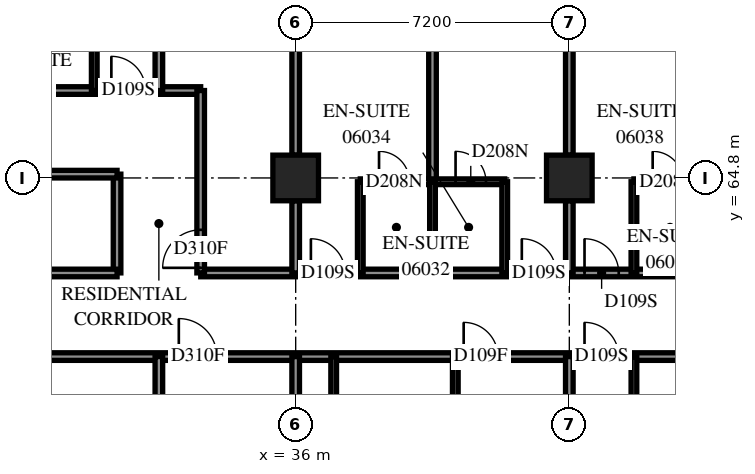
"""IFC4 building model, lengths in metres.
Left out: names, types, materials, properties, quantities, classifications, styles, units other than length and angle.
Written with IfcOpenShell. Run it as: python <this file> out.ifc"""

import sys

from ifc_helpers import new_model, si_unit, direction, frame, frame_2d, origin, origin_2d, place, context, subcontext, project, spatial, rectangle, extrude, element, fill, save


model = new_model("IFC4")
c1 = context("Model", 3, precision=1e-05, world=origin(), true_north=direction((0.0, 1.0)))
c2 = subcontext(c1, "Body", "Model", "MODEL_VIEW")
j1 = project(units=[si_unit("LENGTHUNIT", "METRE"), si_unit("PLANEANGLEUNIT", "RADIAN")], contexts=[c1])
p1 = place(None, origin())
s1 = spatial("IfcSite", under=j1, at=p1, CompositionType="ELEMENT")
p2 = place(p1, origin())
s2 = spatial("IfcBuilding", under=s1, at=p2, CompositionType="ELEMENT")
p3 = place(p2, frame((0.0, 0.0, 27.0)))
s3 = spatial("IfcBuildingStorey", under=s2, at=p3, CompositionType="ELEMENT", Elevation=27.0)
for number, where, z_axis, x_axis in (
    (1, (36.0, 64.8, 0.0), (0.0, 0.0, 1.0), (1.0, 0.0, 0.0)),
    (2, (43.2, 64.8, 0.0), (0.0, 0.0, 1.0), (1.0, 0.0, 0.0)),
):
    element("IfcColumn", number, at=place(p3, frame(where, z_axis=z_axis, x_axis=x_axis)), inside=s3, PredefinedType="COLUMN", context=c2, shape_type="SweptSolid", body=[
        extrude(rectangle(XDim=1.2, YDim=1.2, at=origin_2d()), origin(), (0.0, 0.0, 1.0), 3.1),
    ])
p4 = place(p3, frame((28.8, 60.1, 0.0), z_axis=(0.0, 0.0, 1.0), x_axis=(1.0, 0.0, 0.0)))
e3 = element("IfcWall", 3, at=p4, inside=s3, PredefinedType="PARTITIONING", context=c2, shape_type="SweptSolid", body=[
    extrude(rectangle(XDim=24.1, YDim=0.2, at=frame_2d((12.05, 0.0))), origin(), (0.0, 0.0, 1.0), 3.1),
])
p5 = place(p4, frame((4.125, 0.0, 0.0)))
e4 = element("IfcOpeningElement", 4, at=p5, cuts=e3, PredefinedType="OPENING", context=c2, shape_type="SweptSolid", body=[
    extrude(rectangle(XDim=1.0, YDim=2.1, at=frame_2d((0.5, 1.05))), frame((0.0, 0.11, 0.0), z_axis=(0.0, -1.0, 0.0), x_axis=(1.0, 0.0, 0.0)), (0.0, 0.0, 1.0), 0.22),
])
p6 = place(p4, frame((11.62, 0.0, 0.0)))
e5 = element("IfcOpeningElement", 5, at=p6, cuts=e3, PredefinedType="OPENING", context=c2, shape_type="SweptSolid", body=[
    extrude(rectangle(XDim=0.9, YDim=2.1, at=frame_2d((0.45, 1.05))), frame((0.0, 0.11, 0.0), z_axis=(0.0, -1.0, 0.0), x_axis=(1.0, 0.0, 0.0)), (0.0, 0.0, 1.0), 0.22),
])
p7 = place(p4, frame((14.8, 0.0, 0.0)))
e6 = element("IfcOpeningElement", 6, at=p7, cuts=e3, PredefinedType="OPENING", context=c2, shape_type="SweptSolid", body=[
    extrude(rectangle(XDim=0.9, YDim=2.1, at=frame_2d((0.45, 1.05))), frame((0.0, 0.11, 0.0), z_axis=(0.0, -1.0, 0.0), x_axis=(1.0, 0.0, 0.0)), (0.0, 0.0, 1.0), 0.22),
])
p8 = place(p4, frame((18.835, 0.0, 0.0)))
e7 = element("IfcOpeningElement", 7, at=p8, cuts=e3, PredefinedType="OPENING", context=c2, shape_type="SweptSolid", body=[
    extrude(rectangle(XDim=1.0, YDim=2.1, at=frame_2d((0.5, 1.05))), frame((0.0, 0.11, 0.0), z_axis=(0.0, -1.0, 0.0), x_axis=(1.0, 0.0, 0.0)), (0.0, 0.0, 1.0), 0.22),
])
p9 = place(p4, frame((22.854, 0.0, 0.0)))
e8 = element("IfcOpeningElement", 8, at=p9, cuts=e3, PredefinedType="OPENING", context=c2, shape_type="SweptSolid", body=[
    extrude(rectangle(XDim=1.0, YDim=2.1, at=frame_2d((0.5, 1.05))), frame((0.0, 0.11, 0.0), z_axis=(0.0, -1.0, 0.0), x_axis=(1.0, 0.0, 0.0)), (0.0, 0.0, 1.0), 0.22),
])
p10 = place(p3, frame((33.502, 62.3, 0.0), z_axis=(0.0, 0.0, 1.0), x_axis=(1.0, 0.0, 0.0)))
e9 = element("IfcWall", 9, at=p10, inside=s3, PredefinedType="PARTITIONING", context=c2, shape_type="SweptSolid", body=[
    extrude(rectangle(XDim=20.998, YDim=0.2, at=frame_2d((10.499, 0.0))), origin(), (0.0, 0.0, 1.0), 3.1),
])
p11 = place(p10, frame((2.898, 0.0, 0.0)))
e10 = element("IfcOpeningElement", 10, at=p11, cuts=e9, PredefinedType="OPENING", context=c2, shape_type="SweptSolid", body=[
    extrude(rectangle(XDim=0.9, YDim=2.1, at=frame_2d((0.45, 1.05))), frame((0.0, 0.11, 0.0), z_axis=(0.0, -1.0, 0.0), x_axis=(1.0, 0.0, 0.0)), (0.0, 0.0, 1.0), 0.22),
])
p12 = place(p10, frame((8.448, 0.0, 0.0)))
e11 = element("IfcOpeningElement", 11, at=p12, cuts=e9, PredefinedType="OPENING", context=c2, shape_type="SweptSolid", body=[
    extrude(rectangle(XDim=0.9, YDim=2.1, at=frame_2d((0.45, 1.05))), frame((0.0, 0.11, 0.0), z_axis=(0.0, -1.0, 0.0), x_axis=(1.0, 0.0, 0.0)), (0.0, 0.0, 1.0), 0.22),
])
p13 = place(p10, frame((10.098, 0.0, 0.0)))
e12 = element("IfcOpeningElement", 12, at=p13, cuts=e9, PredefinedType="OPENING", context=c2, shape_type="SweptSolid", body=[
    extrude(rectangle(XDim=0.9, YDim=2.1, at=frame_2d((0.45, 1.05))), frame((0.0, 0.11, 0.0), z_axis=(0.0, -1.0, 0.0), x_axis=(1.0, 0.0, 0.0)), (0.0, 0.0, 1.0), 0.22),
])
p14 = place(p10, frame((15.648, 0.0, 0.0)))
e13 = element("IfcOpeningElement", 13, at=p14, cuts=e9, PredefinedType="OPENING", context=c2, shape_type="SweptSolid", body=[
    extrude(rectangle(XDim=0.9, YDim=2.1, at=frame_2d((0.45, 1.05))), frame((0.0, 0.11, 0.0), z_axis=(0.0, -1.0, 0.0), x_axis=(1.0, 0.0, 0.0)), (0.0, 0.0, 1.0), 0.22),
])
p15 = place(p10, frame((17.298, 0.0, 0.0)))
e14 = element("IfcOpeningElement", 14, at=p15, cuts=e9, PredefinedType="OPENING", context=c2, shape_type="SweptSolid", body=[
    extrude(rectangle(XDim=0.9, YDim=2.1, at=frame_2d((0.45, 1.05))), frame((0.0, 0.11, 0.0), z_axis=(0.0, -1.0, 0.0), x_axis=(1.0, 0.0, 0.0)), (0.0, 0.0, 1.0), 0.22),
])
p16 = place(p3, frame((21.602, 67.1, 0.0), z_axis=(0.0, 0.0, 1.0), x_axis=(1.0, 0.0, 0.0)))
e15 = element("IfcWall", 15, at=p16, inside=s3, PredefinedType="PARTITIONING", context=c2, shape_type="SweptSolid", body=[
    extrude(rectangle(XDim=11.898, YDim=0.2, at=frame_2d((5.949, 0.0))), origin(), (0.0, 0.0, 1.0), 3.1),
])
p17 = place(p16, frame((1.798, 0.0, 0.0)))
e16 = element("IfcOpeningElement", 16, at=p17, cuts=e15, PredefinedType="OPENING", context=c2, shape_type="SweptSolid", body=[
    extrude(rectangle(XDim=1.0, YDim=2.1, at=frame_2d((0.5, 1.05))), frame((0.0, 0.11, 0.0), z_axis=(0.0, -1.0, 0.0), x_axis=(1.0, 0.0, 0.0)), (0.0, 0.0, 1.0), 0.22),
])
p18 = place(p16, frame((3.998, 0.0, 0.0)))
e17 = element("IfcOpeningElement", 17, at=p18, cuts=e15, PredefinedType="OPENING", context=c2, shape_type="SweptSolid", body=[
    extrude(rectangle(XDim=0.9, YDim=2.1, at=frame_2d((0.45, 1.05))), frame((0.0, 0.11, 0.0), z_axis=(0.0, -1.0, 0.0), x_axis=(1.0, 0.0, 0.0)), (0.0, 0.0, 1.0), 0.22),
])
p19 = place(p16, frame((9.548, 0.0, 0.0)))
e18 = element("IfcOpeningElement", 18, at=p19, cuts=e15, PredefinedType="OPENING", context=c2, shape_type="SweptSolid", body=[
    extrude(rectangle(XDim=0.9, YDim=2.1, at=frame_2d((0.45, 1.05))), frame((0.0, 0.11, 0.0), z_axis=(0.0, -1.0, 0.0), x_axis=(1.0, 0.0, 0.0)), (0.0, 0.0, 1.0), 0.22),
])
p20 = place(p3, frame((39.6, 64.7, 0.0), z_axis=(0.0, 0.0, 1.0), x_axis=(0.0, 1.0, 0.0)))
e19 = element("IfcWall", 19, at=p20, inside=s3, PredefinedType="PARTITIONING", context=c2, shape_type="SweptSolid", body=[
    extrude(rectangle(XDim=8.041, YDim=0.2, at=frame_2d((4.021, 0.0))), origin(), (0.0, 0.0, 1.0), 3.1),
])
for number, where, z_axis, x_axis in (
    (20, (36.0, 65.4, 0.0), (0.0, 0.0, 1.0), (0.0, 1.0, 0.0)),
    (21, (43.2, 65.4, 0.0), (0.0, 0.0, 1.0), (0.0, 1.0, 0.0)),
):
    element("IfcWall", number, at=place(p3, frame(where, z_axis=z_axis, x_axis=x_axis)), inside=s3, PredefinedType="PARTITIONING", context=c2, shape_type="SweptSolid", body=[
        extrude(rectangle(XDim=6.0, YDim=0.2, at=frame_2d((3.0, 0.0))), origin(), (0.0, 0.0, 1.0), 3.1),
    ])
p21 = place(p3, frame((32.4, 67.1, 0.0), z_axis=(0.0, 0.0, 1.0), x_axis=(0.0, 1.0, 0.0)))
e22 = element("IfcWall", 22, at=p21, inside=s3, PredefinedType="PARTITIONING", context=c2, shape_type="SweptSolid", body=[
    extrude(rectangle(XDim=5.671, YDim=0.2, at=frame_2d((2.835, 0.0))), origin(), (0.0, 0.0, 1.0), 3.1),
])
p22 = place(p3, frame((33.5, 62.302, 0.0), z_axis=(0.0, 0.0, 1.0), x_axis=(0.0, 1.0, 0.0)))
e23 = element("IfcWall", 23, at=p22, inside=s3, PredefinedType="PARTITIONING", context=c2, shape_type="SweptSolid", body=[
    extrude(rectangle(XDim=4.798, YDim=0.2, at=frame_2d((2.399, 0.0))), origin(), (0.0, 0.0, 1.0), 3.1),
])
p23 = place(p22, frame((0.133, 0.0, 0.0)))
e24 = element("IfcOpeningElement", 24, at=p23, cuts=e23, PredefinedType="OPENING", context=c2, shape_type="SweptSolid", body=[
    extrude(rectangle(XDim=1.0, YDim=2.1, at=frame_2d((0.5, 1.05))), frame((0.0, 0.11, 0.0), z_axis=(0.0, -1.0, 0.0), x_axis=(1.0, 0.0, 0.0)), (0.0, 0.0, 1.0), 0.22),
])
p24 = place(p3, frame((44.9, 64.7, 0.0), z_axis=(0.0, 0.0, 1.0), x_axis=(1.0, 0.0, 0.0)))
e25 = element("IfcWall", 25, at=p24, inside=s3, PredefinedType="PARTITIONING", context=c2, shape_type="SweptSolid", body=[
    extrude(rectangle(XDim=3.8, YDim=0.15, at=frame_2d((1.9, 0.0))), origin(), (0.0, 0.0, 1.0), 3.1),
])
p25 = place(p24, frame((0.493, 0.0, 0.0)))
e26 = element("IfcOpeningElement", 26, at=p25, cuts=e25, PredefinedType="OPENING", context=c2, shape_type="SweptSolid", body=[
    extrude(rectangle(XDim=0.8, YDim=2.1, at=frame_2d((0.4, 1.05))), frame((0.0, 0.085, 0.0), z_axis=(0.0, -1.0, 0.0), x_axis=(1.0, 0.0, 0.0)), (0.0, 0.0, 1.0), 0.17),
])
p26 = place(p24, frame((2.507, 0.0, 0.0)))
e27 = element("IfcOpeningElement", 27, at=p26, cuts=e25, PredefinedType="OPENING", context=c2, shape_type="SweptSolid", body=[
    extrude(rectangle(XDim=0.8, YDim=2.1, at=frame_2d((0.4, 1.05))), frame((0.0, 0.085, 0.0), z_axis=(0.0, -1.0, 0.0), x_axis=(1.0, 0.0, 0.0)), (0.0, 0.0, 1.0), 0.17),
])
p27 = place(p3, frame((37.7, 64.7, 0.0), z_axis=(0.0, 0.0, 1.0), x_axis=(1.0, 0.0, 0.0)))
e28 = element("IfcWall", 28, at=p27, inside=s3, PredefinedType="PARTITIONING", context=c2, shape_type="SweptSolid", body=[
    extrude(rectangle(XDim=3.8, YDim=0.15, at=frame_2d((1.9, 0.0))), origin(), (0.0, 0.0, 1.0), 3.1),
])
p28 = place(p27, frame((0.493, 0.0, 0.0)))
e29 = element("IfcOpeningElement", 29, at=p28, cuts=e28, PredefinedType="OPENING", context=c2, shape_type="SweptSolid", body=[
    extrude(rectangle(XDim=0.8, YDim=2.1, at=frame_2d((0.4, 1.05))), frame((0.0, 0.085, 0.0), z_axis=(0.0, -1.0, 0.0), x_axis=(1.0, 0.0, 0.0)), (0.0, 0.0, 1.0), 0.17),
])
p29 = place(p27, frame((2.507, 0.0, 0.0)))
e30 = element("IfcOpeningElement", 30, at=p29, cuts=e28, PredefinedType="OPENING", context=c2, shape_type="SweptSolid", body=[
    extrude(rectangle(XDim=0.8, YDim=2.1, at=frame_2d((0.4, 1.05))), frame((0.0, 0.085, 0.0), z_axis=(0.0, -1.0, 0.0), x_axis=(1.0, 0.0, 0.0)), (0.0, 0.0, 1.0), 0.17),
])
p30 = place(p3, frame((32.4, 56.95, 0.0), z_axis=(0.0, 0.0, 1.0), x_axis=(0.0, 1.0, 0.0)))
e31 = element("IfcWall", 31, at=p30, inside=s3, PredefinedType="PARTITIONING", context=c2, shape_type="SweptSolid", body=[
    extrude(rectangle(XDim=3.15, YDim=0.2, at=frame_2d((1.575, 0.0))), origin(), (0.0, 0.0, 1.0), 3.1),
])
p31 = place(p3, frame((31.3, 62.302, 0.0), z_axis=(0.0, 0.0, 1.0), x_axis=(0.0, 1.0, 0.0)))
e32 = element("IfcWall", 32, at=p31, inside=s3, PredefinedType="PARTITIONING", context=c2, shape_type="SweptSolid", body=[
    extrude(rectangle(XDim=2.598, YDim=0.2, at=frame_2d((1.299, 0.0))), origin(), (0.0, 0.0, 1.0), 3.1),
])
p32 = place(p3, frame((28.802, 62.3, 0.0), z_axis=(0.0, 0.0, 1.0), x_axis=(1.0, 0.0, 0.0)))
e33 = element("IfcWall", 33, at=p32, inside=s3, PredefinedType="PARTITIONING", context=c2, shape_type="SweptSolid", body=[
    extrude(rectangle(XDim=2.498, YDim=0.2, at=frame_2d((1.249, 0.0))), origin(), (0.0, 0.0, 1.0), 3.1),
])
for number, where, z_axis, x_axis in (
    (34, (30.7, 67.1, 0.0), (0.0, 0.0, 1.0), (0.0, 1.0, 0.0)),
    (35, (37.7, 62.3, 0.0), (0.0, 0.0, 1.0), (0.0, 1.0, 0.0)),
    (36, (39.6, 62.3, 0.0), (0.0, 0.0, 1.0), (0.0, 1.0, 0.0)),
    (37, (41.5, 62.3, 0.0), (0.0, 0.0, 1.0), (0.0, 1.0, 0.0)),
    (38, (44.9, 62.3, 0.0), (0.0, 0.0, 1.0), (0.0, 1.0, 0.0)),
    (39, (40.2, 57.7, 0.0), (0.0, 0.0, 1.0), (0.0, 1.0, 0.0)),
    (40, (37.0, 57.7, 0.0), (0.0, 0.0, 1.0), (0.0, 1.0, 0.0)),
    (41, (44.9, 57.7, 0.0), (0.0, 0.0, 1.0), (0.0, 1.0, 0.0)),
):
    element("IfcWall", number, at=place(p3, frame(where, z_axis=z_axis, x_axis=x_axis)), inside=s3, PredefinedType="PARTITIONING", context=c2, shape_type="SweptSolid", body=[
        extrude(rectangle(XDim=2.4, YDim=0.15, at=frame_2d((1.2, 0.0))), origin(), (0.0, 0.0, 1.0), 3.1),
    ])
for number, where, z_axis, x_axis in (
    (42, (36.0, 62.3, 0.0), (0.0, 0.0, 1.0), (0.0, 1.0, 0.0)),
    (43, (43.2, 62.3, 0.0), (0.0, 0.0, 1.0), (0.0, 1.0, 0.0)),
    (44, (29.4, 64.9, 0.0), (0.0, 0.0, 1.0), (1.0, 0.0, 0.0)),
    (45, (36.0, 58.2, 0.0), (0.0, 0.0, 1.0), (0.0, 1.0, 0.0)),
    (46, (43.2, 58.2, 0.0), (0.0, 0.0, 1.0), (0.0, 1.0, 0.0)),
):
    element("IfcWall", number, at=place(p3, frame(where, z_axis=z_axis, x_axis=x_axis)), inside=s3, PredefinedType="PARTITIONING", context=c2, shape_type="SweptSolid", body=[
        extrude(rectangle(XDim=1.9, YDim=0.2, at=frame_2d((0.95, 0.0))), origin(), (0.0, 0.0, 1.0), 3.1),
    ])
p33 = place(p19, origin())
e47 = element("IfcDoor", 47, at=p33, inside=s3, OperationType="SINGLE_SWING_RIGHT", PredefinedType="DOOR", context=c2, shape_type="SweptSolid", body=[
    extrude(rectangle(XDim=0.9, YDim=2.1, at=frame_2d((0.45, 1.05))), frame((0.0, 0.025, 0.0), z_axis=(0.0, -1.0, 0.0), x_axis=(1.0, 0.0, 0.0)), (0.0, 0.0, 1.0), 0.05),
])
fill(e18, e47)
p34 = place(p5, origin())
e48 = element("IfcDoor", 48, at=p34, inside=s3, OperationType="SINGLE_SWING_RIGHT", PredefinedType="DOOR", context=c2, shape_type="SweptSolid", body=[
    extrude(rectangle(XDim=1.0, YDim=2.1, at=frame_2d((0.5, 1.05))), frame((0.0, 0.025, 0.0), z_axis=(0.0, -1.0, 0.0), x_axis=(1.0, 0.0, 0.0)), (0.0, 0.0, 1.0), 0.05),
])
fill(e4, e48)
p35 = place(p6, origin())
e49 = element("IfcDoor", 49, at=p35, inside=s3, OperationType="SINGLE_SWING_LEFT", PredefinedType="DOOR", context=c2, shape_type="SweptSolid", body=[
    extrude(rectangle(XDim=0.9, YDim=2.1, at=frame_2d((0.45, 1.05))), frame((0.0, 0.025, 0.0), z_axis=(0.0, -1.0, 0.0), x_axis=(1.0, 0.0, 0.0)), (0.0, 0.0, 1.0), 0.05),
])
fill(e5, e49)
p36 = place(p7, origin())
e50 = element("IfcDoor", 50, at=p36, inside=s3, OperationType="SINGLE_SWING_LEFT", PredefinedType="DOOR", context=c2, shape_type="SweptSolid", body=[
    extrude(rectangle(XDim=0.9, YDim=2.1, at=frame_2d((0.45, 1.05))), frame((0.0, 0.025, 0.0), z_axis=(0.0, -1.0, 0.0), x_axis=(1.0, 0.0, 0.0)), (0.0, 0.0, 1.0), 0.05),
])
fill(e6, e50)
p37 = place(p23, origin())
e51 = element("IfcDoor", 51, at=p37, inside=s3, OperationType="SINGLE_SWING_LEFT", PredefinedType="DOOR", context=c2, shape_type="SweptSolid", body=[
    extrude(rectangle(XDim=1.0, YDim=2.1, at=frame_2d((0.5, 1.05))), frame((0.0, 0.025, 0.0), z_axis=(0.0, -1.0, 0.0), x_axis=(1.0, 0.0, 0.0)), (0.0, 0.0, 1.0), 0.05),
])
fill(e24, e51)
p38 = place(p11, origin())
e52 = element("IfcDoor", 52, at=p38, inside=s3, OperationType="SINGLE_SWING_RIGHT", PredefinedType="DOOR", context=c2, shape_type="SweptSolid", body=[
    extrude(rectangle(XDim=0.9, YDim=2.1, at=frame_2d((0.45, 1.05))), frame((0.0, 0.025, 0.0), z_axis=(0.0, -1.0, 0.0), x_axis=(1.0, 0.0, 0.0)), (0.0, 0.0, 1.0), 0.05),
])
fill(e10, e52)
p39 = place(p28, origin())
e53 = element("IfcDoor", 53, at=p39, inside=s3, OperationType="SINGLE_SWING_RIGHT", PredefinedType="DOOR", context=c2, shape_type="SweptSolid", body=[
    extrude(rectangle(XDim=0.8, YDim=2.1, at=frame_2d((0.4, 1.05))), frame((0.0, 0.025, 0.0), z_axis=(0.0, -1.0, 0.0), x_axis=(1.0, 0.0, 0.0)), (0.0, 0.0, 1.0), 0.05),
])
fill(e29, e53)
p40 = place(p12, origin())
e54 = element("IfcDoor", 54, at=p40, inside=s3, OperationType="SINGLE_SWING_LEFT", PredefinedType="DOOR", context=c2, shape_type="SweptSolid", body=[
    extrude(rectangle(XDim=0.9, YDim=2.1, at=frame_2d((0.45, 1.05))), frame((0.0, 0.025, 0.0), z_axis=(0.0, -1.0, 0.0), x_axis=(1.0, 0.0, 0.0)), (0.0, 0.0, 1.0), 0.05),
])
fill(e11, e54)
p41 = place(p29, origin())
e55 = element("IfcDoor", 55, at=p41, inside=s3, OperationType="SINGLE_SWING_RIGHT", PredefinedType="DOOR", context=c2, shape_type="SweptSolid", body=[
    extrude(rectangle(XDim=0.8, YDim=2.1, at=frame_2d((0.4, 1.05))), frame((0.0, 0.025, 0.0), z_axis=(0.0, -1.0, 0.0), x_axis=(1.0, 0.0, 0.0)), (0.0, 0.0, 1.0), 0.05),
])
fill(e30, e55)
p42 = place(p13, origin())
e56 = element("IfcDoor", 56, at=p42, inside=s3, OperationType="SINGLE_SWING_RIGHT", PredefinedType="DOOR", context=c2, shape_type="SweptSolid", body=[
    extrude(rectangle(XDim=0.9, YDim=2.1, at=frame_2d((0.45, 1.05))), frame((0.0, 0.025, 0.0), z_axis=(0.0, -1.0, 0.0), x_axis=(1.0, 0.0, 0.0)), (0.0, 0.0, 1.0), 0.05),
])
fill(e12, e56)
p43 = place(p25, origin())
e57 = element("IfcDoor", 57, at=p43, inside=s3, OperationType="SINGLE_SWING_RIGHT", PredefinedType="DOOR", context=c2, shape_type="SweptSolid", body=[
    extrude(rectangle(XDim=0.8, YDim=2.1, at=frame_2d((0.4, 1.05))), frame((0.0, 0.025, 0.0), z_axis=(0.0, -1.0, 0.0), x_axis=(1.0, 0.0, 0.0)), (0.0, 0.0, 1.0), 0.05),
])
fill(e26, e57)
save(model, sys.argv[1])
